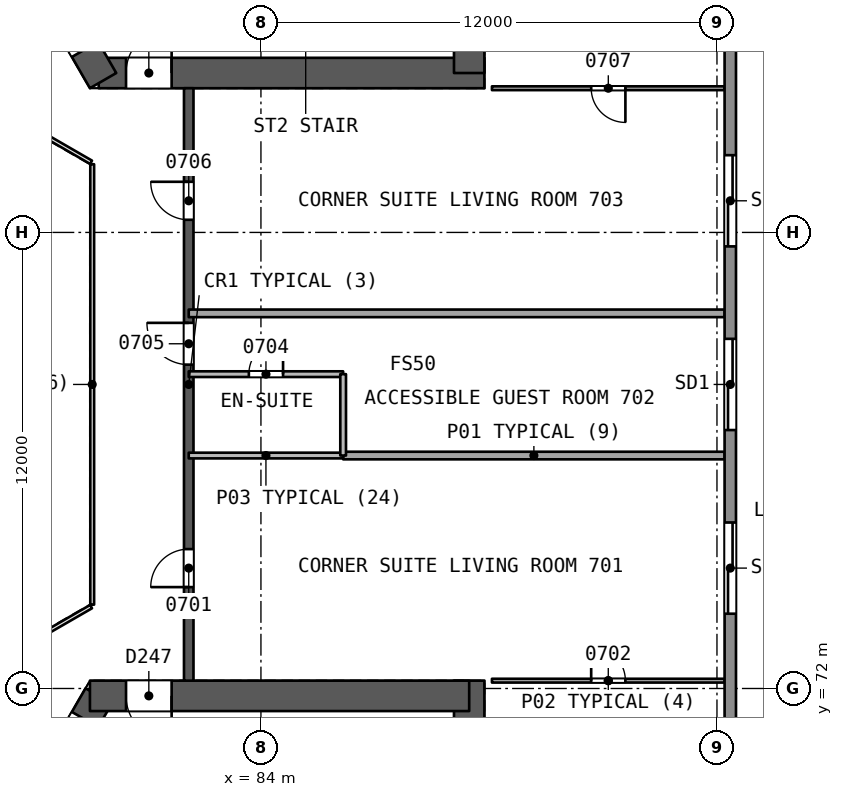
"""IFC4 building model, lengths in metres.
Left out: names, types, materials, properties, quantities, classifications, styles, units other than length and angle.
Written with IfcOpenShell. Run it as: python <this file> out.ifc"""

import sys

from ifc_helpers import new_model, si_unit, direction, frame, frame_2d, origin, place, context, subcontext, project, spatial, rectangle, extrude, element, fill, save


model = new_model("IFC4")
c1 = context("Model", 3, precision=1e-05, world=origin(), true_north=direction((0.0, 1.0)))
c2 = subcontext(c1, "Body", "Model", "MODEL_VIEW")
j1 = project(units=[si_unit("LENGTHUNIT", "METRE"), si_unit("PLANEANGLEUNIT", "RADIAN")], contexts=[c1])
p1 = place(None, origin())
s1 = spatial("IfcSite", under=j1, at=p1, CompositionType="ELEMENT")
p2 = place(p1, origin())
s2 = spatial("IfcBuilding", under=s1, at=p2, CompositionType="ELEMENT")
p3 = place(p2, frame((0.0, 0.0, 37.4)))
s3 = spatial("IfcBuildingStorey", under=s2, at=p3, CompositionType="ELEMENT", Elevation=37.4)
p4 = place(p3, frame((79.731, 88.194, 0.0), z_axis=(0.0, 0.0, 1.0), x_axis=(1.0, 0.0, 0.0)))
e1 = element("IfcWall", 1, at=p4, inside=s3, PredefinedType="SHEAR", context=c2, shape_type="SweptSolid", body=[
    extrude(rectangle(XDim=10.149, YDim=0.8, at=frame_2d((5.074, 0.0))), origin(), (0.0, 0.0, 1.0), 3.7),
])
p5 = place(p4, frame((0.719, 0.0, 0.0)))
e2 = element("IfcOpeningElement", 2, at=p5, cuts=e1, PredefinedType="OPENING", context=c2, shape_type="SweptSolid", body=[
    extrude(rectangle(XDim=1.2, YDim=2.1, at=frame_2d((0.6, 1.05))), frame((0.0, 0.411, 0.0), z_axis=(0.0, -1.0, 0.0), x_axis=(1.0, 0.0, 0.0)), (0.0, 0.0, 1.0), 0.821),
])
p6 = place(p3, frame((89.48, 88.194, 0.0), z_axis=(0.0, 0.0, 1.0), x_axis=(0.0, 1.0, 0.0)))
e3 = element("IfcWall", 3, at=p6, inside=s3, PredefinedType="SHEAR", context=c2, shape_type="SweptSolid", body=[
    extrude(rectangle(XDim=13.933, YDim=0.8, at=frame_2d((6.967, 0.0))), origin(), (0.0, 0.0, 1.0), 3.7),
])
p7 = place(p3, frame((74.856, 96.637, 0.0), z_axis=(0.0, 0.0, 1.0), x_axis=(0.499993500917, -0.866029155999, 0.0)))
e4 = element("IfcWall", 4, at=p7, inside=s3, PredefinedType="SHEAR", context=c2, shape_type="SweptSolid", body=[
    extrude(rectangle(XDim=9.98, YDim=0.8, at=frame_2d((4.99, 0.0))), origin(), (0.0, 0.0, 1.0), 3.7),
])
p8 = place(p7, frame((7.83, 0.0, 0.0)))
e5 = element("IfcOpeningElement", 5, at=p8, cuts=e4, PredefinedType="OPENING", context=c2, shape_type="SweptSolid", body=[
    extrude(rectangle(XDim=1.2, YDim=2.1, at=frame_2d((0.6, 1.05))), frame((0.0, 0.411, 0.0), z_axis=(0.0, -1.0, 0.0), x_axis=(1.0, 0.0, 0.0)), (0.0, 0.0, 1.0), 0.821),
])
p9 = place(p3, frame((79.731, 71.806, 0.0), z_axis=(0.0, 0.0, 1.0), x_axis=(-0.49999662545, -0.866027352073, 0.0)))
e6 = element("IfcWall", 6, at=p9, inside=s3, PredefinedType="SHEAR", context=c2, shape_type="SweptSolid", body=[
    extrude(rectangle(XDim=10.149, YDim=0.8, at=frame_2d((5.074, 0.0))), origin(), (0.0, 0.0, 1.0), 3.7),
])
p10 = place(p9, frame((0.719, 0.0, 0.0)))
e7 = element("IfcOpeningElement", 7, at=p10, cuts=e6, PredefinedType="OPENING", context=c2, shape_type="SweptSolid", body=[
    extrude(rectangle(XDim=1.2, YDim=2.1, at=frame_2d((0.6, 1.05))), frame((0.0, 0.411, 0.0), z_axis=(0.0, -1.0, 0.0), x_axis=(1.0, 0.0, 0.0)), (0.0, 0.0, 1.0), 0.821),
])
p11 = place(p3, frame((89.48, 58.103, 0.0), z_axis=(0.0, 0.0, 1.0), x_axis=(0.0, 1.0, 0.0)))
e8 = element("IfcWall", 8, at=p11, inside=s3, PredefinedType="SHEAR", context=c2, shape_type="SweptSolid", body=[
    extrude(rectangle(XDim=14.103, YDim=0.8, at=frame_2d((7.051, 0.0))), origin(), (0.0, 0.0, 1.0), 3.7),
])
p12 = place(p3, frame((89.48, 71.806, 0.0), z_axis=(0.0, 0.0, 1.0), x_axis=(-1.0, 0.0, 0.0)))
e9 = element("IfcWall", 9, at=p12, inside=s3, PredefinedType="SHEAR", context=c2, shape_type="SweptSolid", body=[
    extrude(rectangle(XDim=9.98, YDim=0.8, at=frame_2d((4.99, 0.0))), origin(), (0.0, 0.0, 1.0), 3.7),
])
p13 = place(p12, frame((7.83, 0.0, 0.0)))
e10 = element("IfcOpeningElement", 10, at=p13, cuts=e9, PredefinedType="OPENING", context=c2, shape_type="SweptSolid", body=[
    extrude(rectangle(XDim=1.2, YDim=2.1, at=frame_2d((0.6, 1.05))), frame((0.0, 0.411, 0.0), z_axis=(0.0, -1.0, 0.0), x_axis=(1.0, 0.0, 0.0)), (0.0, 0.0, 1.0), 0.821),
])
p14 = place(p3, frame((82.1, 72.206, 0.0), z_axis=(0.0, 0.0, 1.0), x_axis=(0.0, 1.0, 0.0)))
e11 = element("IfcWall", 11, at=p14, inside=s3, PredefinedType="SHEAR", context=c2, shape_type="SweptSolid", body=[
    extrude(rectangle(XDim=15.588, YDim=0.25, at=frame_2d((7.794, 0.0))), origin(), (0.0, 0.0, 1.0), 3.2),
])
p15 = place(p14, frame((2.462, 0.0, 0.0)))
e12 = element("IfcOpeningElement", 12, at=p15, cuts=e11, PredefinedType="OPENING", context=c2, shape_type="SweptSolid", body=[
    extrude(rectangle(XDim=1.0, YDim=2.1, at=frame_2d((0.5, 1.05))), frame((0.0, 0.135, 0.0), z_axis=(0.0, -1.0, 0.0), x_axis=(1.0, 0.0, 0.0)), (0.0, 0.0, 1.0), 0.271),
])
p16 = place(p14, frame((8.315, 0.0, 0.0)))
e13 = element("IfcOpeningElement", 13, at=p16, cuts=e11, PredefinedType="OPENING", context=c2, shape_type="SweptSolid", body=[
    extrude(rectangle(XDim=1.1, YDim=2.1, at=frame_2d((0.55, 1.05))), frame((0.0, 0.135, 0.0), z_axis=(0.0, -1.0, 0.0), x_axis=(1.0, 0.0, 0.0)), (0.0, 0.0, 1.0), 0.271),
])
p17 = place(p14, frame((12.127, 0.0, 0.0)))
e14 = element("IfcOpeningElement", 14, at=p17, cuts=e11, PredefinedType="OPENING", context=c2, shape_type="SweptSolid", body=[
    extrude(rectangle(XDim=1.0, YDim=2.1, at=frame_2d((0.5, 1.05))), frame((0.0, 0.135, 0.0), z_axis=(0.0, -1.0, 0.0), x_axis=(1.0, 0.0, 0.0)), (0.0, 0.0, 1.0), 0.271),
])
p18 = place(p3, frame((90.079, 72.206, 0.0), z_axis=(0.0, 0.0, 1.0), x_axis=(1.0, 0.0, 0.0)))
e15 = element("IfcWall", 15, at=p18, inside=s3, PredefinedType="PARTITIONING", context=c2, shape_type="SweptSolid", body=[
    extrude(rectangle(XDim=6.123, YDim=0.1, at=frame_2d((3.061, 0.0))), origin(), (0.0, 0.0, 1.0), 3.2),
])
p19 = place(p18, frame((2.611, 0.0, 0.0)))
e16 = element("IfcOpeningElement", 16, at=p19, cuts=e15, PredefinedType="OPENING", context=c2, shape_type="SweptSolid", body=[
    extrude(rectangle(XDim=0.9, YDim=2.1, at=frame_2d((0.45, 1.05))), frame((0.0, 0.061, 0.0), z_axis=(0.0, -1.0, 0.0), x_axis=(1.0, 0.0, 0.0)), (0.0, 0.0, 1.0), 0.121),
])
p20 = place(p3, frame((96.202, 78.129, 0.0), z_axis=(0.0, 0.0, 1.0), x_axis=(-1.0, 0.0, 0.0)))
e17 = element("IfcWall", 17, at=p20, inside=s3, PredefinedType="PARTITIONING", context=c2, shape_type="SweptSolid", body=[
    extrude(rectangle(XDim=10.039, YDim=0.2, at=frame_2d((5.019, 0.0))), origin(), (0.0, 0.0, 1.0), 3.2),
])
p21 = place(p3, frame((86.163, 78.129, 0.0), z_axis=(0.0, 0.0, 1.0), x_axis=(-1.0, 0.0, 0.0)))
e18 = element("IfcWall", 18, at=p21, inside=s3, PredefinedType="PARTITIONING", context=c2, shape_type="SweptSolid", body=[
    extrude(rectangle(XDim=4.063, YDim=0.15, at=frame_2d((2.031, 0.0))), origin(), (0.0, 0.0, 1.0), 3.2),
])
p22 = place(p3, frame((82.1, 80.271, 0.0), z_axis=(0.0, 0.0, 1.0), x_axis=(1.0, 0.0, 0.0)))
e19 = element("IfcWall", 19, at=p22, inside=s3, PredefinedType="PARTITIONING", context=c2, shape_type="SweptSolid", body=[
    extrude(rectangle(XDim=4.063, YDim=0.15, at=frame_2d((2.031, 0.0))), origin(), (0.0, 0.0, 1.0), 3.2),
])
p23 = place(p22, frame((1.582, 0.0, 0.0)))
e20 = element("IfcOpeningElement", 20, at=p23, cuts=e19, PredefinedType="OPENING", context=c2, shape_type="SweptSolid", body=[
    extrude(rectangle(XDim=0.9, YDim=2.1, at=frame_2d((0.45, 1.05))), frame((0.0, 0.085, 0.0), z_axis=(0.0, -1.0, 0.0), x_axis=(1.0, 0.0, 0.0)), (0.0, 0.0, 1.0), 0.171),
])
p24 = place(p3, frame((86.163, 80.271, 0.0), z_axis=(0.0, 0.0, 1.0), x_axis=(0.0, -1.0, 0.0)))
e21 = element("IfcWall", 21, at=p24, inside=s3, PredefinedType="PARTITIONING", context=c2, shape_type="SweptSolid", body=[
    extrude(rectangle(XDim=2.141, YDim=0.15, at=frame_2d((1.071, 0.0))), origin(), (0.0, 0.0, 1.0), 3.2),
])
p25 = place(p3, frame((96.202, 81.871, 0.0), z_axis=(0.0, 0.0, 1.0), x_axis=(-1.0, 0.0, 0.0)))
e22 = element("IfcWall", 22, at=p25, inside=s3, PredefinedType="PARTITIONING", context=c2, shape_type="SweptSolid", body=[
    extrude(rectangle(XDim=14.102, YDim=0.2, at=frame_2d((7.051, 0.0))), origin(), (0.0, 0.0, 1.0), 3.2),
])
p26 = place(p3, frame((96.202, 87.794, 0.0), z_axis=(0.0, 0.0, 1.0), x_axis=(-1.0, 0.0, 0.0)))
e23 = element("IfcWall", 23, at=p26, inside=s3, PredefinedType="PARTITIONING", context=c2, shape_type="SweptSolid", body=[
    extrude(rectangle(XDim=6.123, YDim=0.1, at=frame_2d((3.061, 0.0))), origin(), (0.0, 0.0, 1.0), 3.2),
])
p27 = place(p26, frame((2.611, 0.0, 0.0)))
e24 = element("IfcOpeningElement", 24, at=p27, cuts=e23, PredefinedType="OPENING", context=c2, shape_type="SweptSolid", body=[
    extrude(rectangle(XDim=0.9, YDim=2.1, at=frame_2d((0.45, 1.05))), frame((0.0, 0.061, 0.0), z_axis=(0.0, -1.0, 0.0), x_axis=(1.0, 0.0, 0.0)), (0.0, 0.0, 1.0), 0.121),
])
p28 = place(p3, frame((96.351, 110.698, 0.0), z_axis=(0.0, 0.0, 1.0), x_axis=(0.0, -1.0, 0.0)))
e25 = element("IfcWall", 25, at=p28, inside=s3, PredefinedType="SOLIDWALL", context=c2, shape_type="SweptSolid", body=[
    extrude(rectangle(XDim=61.395, YDim=0.3, at=frame_2d((30.698, 0.0))), origin(), (0.0, 0.0, 1.0), 3.2),
])
p29 = place(p28, frame((29.498, 0.0, 0.0)))
e26 = element("IfcOpeningElement", 26, at=p29, cuts=e25, PredefinedType="OPENING", context=c2, shape_type="SweptSolid", body=[
    extrude(rectangle(XDim=2.4, YDim=2.4, at=frame_2d((1.2, 1.2))), frame((0.0, 0.161, 0.0), z_axis=(0.0, -1.0, 0.0), x_axis=(1.0, 0.0, 0.0)), (0.0, 0.0, 1.0), 0.321),
])
p30 = place(p28, frame((34.33, 0.0, 0.0)))
e27 = element("IfcOpeningElement", 27, at=p30, cuts=e25, PredefinedType="OPENING", context=c2, shape_type="SweptSolid", body=[
    extrude(rectangle(XDim=2.4, YDim=2.4, at=frame_2d((1.2, 1.2))), frame((0.0, 0.161, 0.0), z_axis=(0.0, -1.0, 0.0), x_axis=(1.0, 0.0, 0.0)), (0.0, 0.0, 1.0), 0.321),
])
p31 = place(p28, frame((47.603, 0.0, 0.0)))
e28 = element("IfcOpeningElement", 28, at=p31, cuts=e25, PredefinedType="OPENING", context=c2, shape_type="SweptSolid", body=[
    extrude(rectangle(XDim=2.4, YDim=2.4, at=frame_2d((1.2, 1.2))), frame((0.0, 0.161, 0.0), z_axis=(0.0, -1.0, 0.0), x_axis=(1.0, 0.0, 0.0)), (0.0, 0.0, 1.0), 0.321),
])
p32 = place(p28, frame((24.665, 0.0, 0.0)))
e29 = element("IfcOpeningElement", 29, at=p32, cuts=e25, PredefinedType="OPENING", context=c2, shape_type="SweptSolid", body=[
    extrude(rectangle(XDim=2.4, YDim=2.4, at=frame_2d((1.2, 1.2))), frame((0.0, 0.161, 0.0), z_axis=(0.0, -1.0, 0.0), x_axis=(1.0, 0.0, 0.0)), (0.0, 0.0, 1.0), 0.321),
])
p33 = place(p28, frame((11.394, 0.0, 0.0)))
e30 = element("IfcOpeningElement", 30, at=p33, cuts=e25, PredefinedType="OPENING", context=c2, shape_type="SweptSolid", body=[
    extrude(rectangle(XDim=2.4, YDim=2.4, at=frame_2d((1.2, 1.2))), frame((0.0, 0.161, 0.0), z_axis=(0.0, -1.0, 0.0), x_axis=(1.0, 0.0, 0.0)), (0.0, 0.0, 1.0), 0.321),
])
p34 = place(p3, frame((37.74, 83.141, 0.0), z_axis=(0.0, 0.0, 1.0), x_axis=(0.866026524777, 0.499998058379, 0.0)))
e31 = element("IfcWall", 31, at=p34, inside=s3, PredefinedType="SOLIDWALL", context=c2, shape_type="SweptSolid", body=[
    extrude(rectangle(XDim=61.395, YDim=0.3, at=frame_2d((30.698, 0.0))), origin(), (0.0, 0.0, 1.0), 3.2),
])
p35 = place(p34, frame((34.174, 0.0, 0.0)))
e32 = element("IfcOpeningElement", 32, at=p35, cuts=e31, PredefinedType="OPENING", context=c2, shape_type="SweptSolid", body=[
    extrude(rectangle(XDim=2.4, YDim=2.4, at=frame_2d((1.2, 1.2))), frame((0.0, 0.161, 0.0), z_axis=(0.0, -1.0, 0.0), x_axis=(1.0, 0.0, 0.0)), (0.0, 0.0, 1.0), 0.321),
])
p36 = place(p34, frame((47.603, 0.0, 0.0)))
e33 = element("IfcOpeningElement", 33, at=p36, cuts=e31, PredefinedType="OPENING", context=c2, shape_type="SweptSolid", body=[
    extrude(rectangle(XDim=2.4, YDim=2.4, at=frame_2d((1.2, 1.2))), frame((0.0, 0.161, 0.0), z_axis=(0.0, -1.0, 0.0), x_axis=(1.0, 0.0, 0.0)), (0.0, 0.0, 1.0), 0.321),
])
p37 = place(p34, frame((24.198, 0.0, 0.0)))
e34 = element("IfcOpeningElement", 34, at=p37, cuts=e31, PredefinedType="OPENING", context=c2, shape_type="SweptSolid", body=[
    extrude(rectangle(XDim=2.4, YDim=2.4, at=frame_2d((1.2, 1.2))), frame((0.0, 0.161, 0.0), z_axis=(0.0, -1.0, 0.0), x_axis=(1.0, 0.0, 0.0)), (0.0, 0.0, 1.0), 0.321),
])
p38 = place(p34, frame((11.394, 0.0, 0.0)))
e35 = element("IfcOpeningElement", 35, at=p38, cuts=e31, PredefinedType="OPENING", context=c2, shape_type="SweptSolid", body=[
    extrude(rectangle(XDim=2.4, YDim=2.4, at=frame_2d((1.2, 1.2))), frame((0.0, 0.161, 0.0), z_axis=(0.0, -1.0, 0.0), x_axis=(1.0, 0.0, 0.0)), (0.0, 0.0, 1.0), 0.321),
])
p39 = place(p34, frame((28.874, 0.0, 0.0)))
e36 = element("IfcOpeningElement", 36, at=p39, cuts=e31, PredefinedType="OPENING", context=c2, shape_type="SweptSolid", body=[
    extrude(rectangle(XDim=2.4, YDim=2.4, at=frame_2d((1.2, 1.2))), frame((0.0, 0.161, 0.0), z_axis=(0.0, -1.0, 0.0), x_axis=(1.0, 0.0, 0.0)), (0.0, 0.0, 1.0), 0.321),
])
p40 = place(p3, frame((90.91, 46.161, 0.0), z_axis=(0.0, 0.0, 1.0), x_axis=(-0.866026524777, 0.499998058379, 0.0)))
e37 = element("IfcWall", 37, at=p40, inside=s3, PredefinedType="SOLIDWALL", context=c2, shape_type="SweptSolid", body=[
    extrude(rectangle(XDim=61.395, YDim=0.3, at=frame_2d((30.698, 0.0))), origin(), (0.0, 0.0, 1.0), 3.2),
])
p41 = place(p40, frame((29.186, 0.0, 0.0)))
e38 = element("IfcOpeningElement", 38, at=p41, cuts=e37, PredefinedType="OPENING", context=c2, shape_type="SweptSolid", body=[
    extrude(rectangle(XDim=2.4, YDim=2.4, at=frame_2d((1.2, 1.2))), frame((0.0, 0.161, 0.0), z_axis=(0.0, -1.0, 0.0), x_axis=(1.0, 0.0, 0.0)), (0.0, 0.0, 1.0), 0.321),
])
p42 = place(p40, frame((46.448, 0.0, 0.0)))
e39 = element("IfcOpeningElement", 39, at=p42, cuts=e37, PredefinedType="OPENING", context=c2, shape_type="SweptSolid", body=[
    extrude(rectangle(XDim=2.4, YDim=2.4, at=frame_2d((1.2, 1.2))), frame((0.0, 0.161, 0.0), z_axis=(0.0, -1.0, 0.0), x_axis=(1.0, 0.0, 0.0)), (0.0, 0.0, 1.0), 0.321),
])
p43 = place(p40, frame((12.235, 0.0, 0.0)))
e40 = element("IfcOpeningElement", 40, at=p43, cuts=e37, PredefinedType="OPENING", context=c2, shape_type="SweptSolid", body=[
    extrude(rectangle(XDim=2.4, YDim=2.4, at=frame_2d((1.2, 1.2))), frame((0.0, 0.161, 0.0), z_axis=(0.0, -1.0, 0.0), x_axis=(1.0, 0.0, 0.0)), (0.0, 0.0, 1.0), 0.321),
])
p44 = place(p3, frame((79.56, 74.206, 0.0), z_axis=(0.0, 0.0, 1.0), x_axis=(0.0, 1.0, 0.0)))
e41 = element("IfcWall", 41, at=p44, inside=s3, PredefinedType="PARTITIONING", context=c2, shape_type="SweptSolid", body=[
    extrude(rectangle(XDim=11.588, YDim=0.1, at=frame_2d((5.794, 0.0))), origin(), (0.0, 0.0, 1.0), 3.2),
])
for number, where, z_axis, x_axis in (
    (42, (79.53, 85.846, 0.0), (0.0, 0.0, 1.0), (-0.866, 0.5, 0.0)),
    (43, (77.798, 73.154, 0.0), (0.0, 0.0, 1.0), (0.866, 0.5, 0.0)),
):
    element("IfcWall", number, at=place(p3, frame(where, z_axis=z_axis, x_axis=x_axis)), inside=s3, PredefinedType="PARTITIONING", context=c2, shape_type="SweptSolid", body=[
        extrude(rectangle(XDim=2.0, YDim=0.1, at=frame_2d((1.0, 0.0))), origin(), (0.0, 0.0, 1.0), 3.2),
    ])
p45 = place(p15, origin())
e44 = element("IfcDoor", 44, at=p45, inside=s3, OperationType="SINGLE_SWING_LEFT", PredefinedType="NOTDEFINED", context=c2, shape_type="SweptSolid", body=[
    extrude(rectangle(XDim=1.0, YDim=2.1, at=frame_2d((0.5, 1.05))), frame((0.0, 0.025, 0.0), z_axis=(0.0, -1.0, 0.0), x_axis=(1.0, 0.0, 0.0)), (0.0, 0.0, 1.0), 0.05),
])
fill(e12, e44)
p46 = place(p19, origin())
e45 = element("IfcDoor", 45, at=p46, inside=s3, OperationType="SINGLE_SWING_LEFT", PredefinedType="NOTDEFINED", context=c2, shape_type="SweptSolid", body=[
    extrude(rectangle(XDim=0.9, YDim=2.1, at=frame_2d((0.45, 1.05))), frame((0.0, 0.025, 0.0), z_axis=(0.0, -1.0, 0.0), x_axis=(1.0, 0.0, 0.0)), (0.0, 0.0, 1.0), 0.05),
])
fill(e16, e45)
p47 = place(p23, origin())
e46 = element("IfcDoor", 46, at=p47, inside=s3, OperationType="SINGLE_SWING_RIGHT", PredefinedType="NOTDEFINED", context=c2, shape_type="SweptSolid", body=[
    extrude(rectangle(XDim=0.9, YDim=2.1, at=frame_2d((0.45, 1.05))), frame((0.0, 0.025, 0.0), z_axis=(0.0, -1.0, 0.0), x_axis=(1.0, 0.0, 0.0)), (0.0, 0.0, 1.0), 0.05),
])
fill(e20, e46)
p48 = place(p16, origin())
e47 = element("IfcDoor", 47, at=p48, inside=s3, OperationType="SINGLE_SWING_RIGHT", PredefinedType="NOTDEFINED", context=c2, shape_type="SweptSolid", body=[
    extrude(rectangle(XDim=1.1, YDim=2.1, at=frame_2d((0.55, 1.05))), frame((0.0, 0.025, 0.0), z_axis=(0.0, -1.0, 0.0), x_axis=(1.0, 0.0, 0.0)), (0.0, 0.0, 1.0), 0.05),
])
fill(e13, e47)
p49 = place(p17, origin())
e48 = element("IfcDoor", 48, at=p49, inside=s3, OperationType="SINGLE_SWING_RIGHT", PredefinedType="NOTDEFINED", context=c2, shape_type="SweptSolid", body=[
    extrude(rectangle(XDim=1.0, YDim=2.1, at=frame_2d((0.5, 1.05))), frame((0.0, 0.025, 0.0), z_axis=(0.0, -1.0, 0.0), x_axis=(1.0, 0.0, 0.0)), (0.0, 0.0, 1.0), 0.05),
])
fill(e14, e48)
p50 = place(p27, origin())
e49 = element("IfcDoor", 49, at=p50, inside=s3, OperationType="SINGLE_SWING_LEFT", PredefinedType="NOTDEFINED", context=c2, shape_type="SweptSolid", body=[
    extrude(rectangle(XDim=0.9, YDim=2.1, at=frame_2d((0.45, 1.05))), frame((0.0, 0.025, 0.0), z_axis=(0.0, -1.0, 0.0), x_axis=(1.0, 0.0, 0.0)), (0.0, 0.0, 1.0), 0.05),
])
fill(e24, e49)
p51 = place(p29, origin())
e50 = element("IfcDoor", 50, at=p51, inside=s3, OperationType="SLIDING_TO_LEFT", PredefinedType="NOTDEFINED", context=c2, shape_type="SweptSolid", body=[
    extrude(rectangle(XDim=2.4, YDim=2.4, at=frame_2d((1.2, 1.2))), frame((0.0, 0.025, 0.0), z_axis=(0.0, -1.0, 0.0), x_axis=(1.0, 0.0, 0.0)), (0.0, 0.0, 1.0), 0.05),
])
fill(e26, e50)
p52 = place(p30, origin())
e51 = element("IfcDoor", 51, at=p52, inside=s3, OperationType="SLIDING_TO_RIGHT", PredefinedType="NOTDEFINED", context=c2, shape_type="SweptSolid", body=[
    extrude(rectangle(XDim=2.4, YDim=2.4, at=frame_2d((1.2, 1.2))), frame((0.0, 0.025, 0.0), z_axis=(0.0, -1.0, 0.0), x_axis=(1.0, 0.0, 0.0)), (0.0, 0.0, 1.0), 0.05),
])
fill(e27, e51)
p53 = place(p32, origin())
e52 = element("IfcDoor", 52, at=p53, inside=s3, OperationType="SLIDING_TO_RIGHT", PredefinedType="NOTDEFINED", context=c2, shape_type="SweptSolid", body=[
    extrude(rectangle(XDim=2.4, YDim=2.4, at=frame_2d((1.2, 1.2))), frame((0.0, 0.025, 0.0), z_axis=(0.0, -1.0, 0.0), x_axis=(1.0, 0.0, 0.0)), (0.0, 0.0, 1.0), 0.05),
])
fill(e29, e52)
p54 = place(p5, origin())
e53 = element("IfcDoor", 53, at=p54, inside=s3, OperationType="SINGLE_SWING_RIGHT", PredefinedType="NOTDEFINED", context=c2, shape_type="SweptSolid", body=[
    extrude(rectangle(XDim=1.2, YDim=2.1, at=frame_2d((0.6, 1.05))), frame((0.0, 0.025, 0.0), z_axis=(0.0, -1.0, 0.0), x_axis=(1.0, 0.0, 0.0)), (0.0, 0.0, 1.0), 0.05),
])
fill(e2, e53)
p55 = place(p13, origin())
e54 = element("IfcDoor", 54, at=p55, inside=s3, OperationType="SINGLE_SWING_LEFT", PredefinedType="NOTDEFINED", context=c2, shape_type="SweptSolid", body=[
    extrude(rectangle(XDim=1.2, YDim=2.1, at=frame_2d((0.6, 1.05))), frame((0.0, 0.025, 0.0), z_axis=(0.0, -1.0, 0.0), x_axis=(1.0, 0.0, 0.0)), (0.0, 0.0, 1.0), 0.05),
])
fill(e10, e54)
save(model, sys.argv[1])
